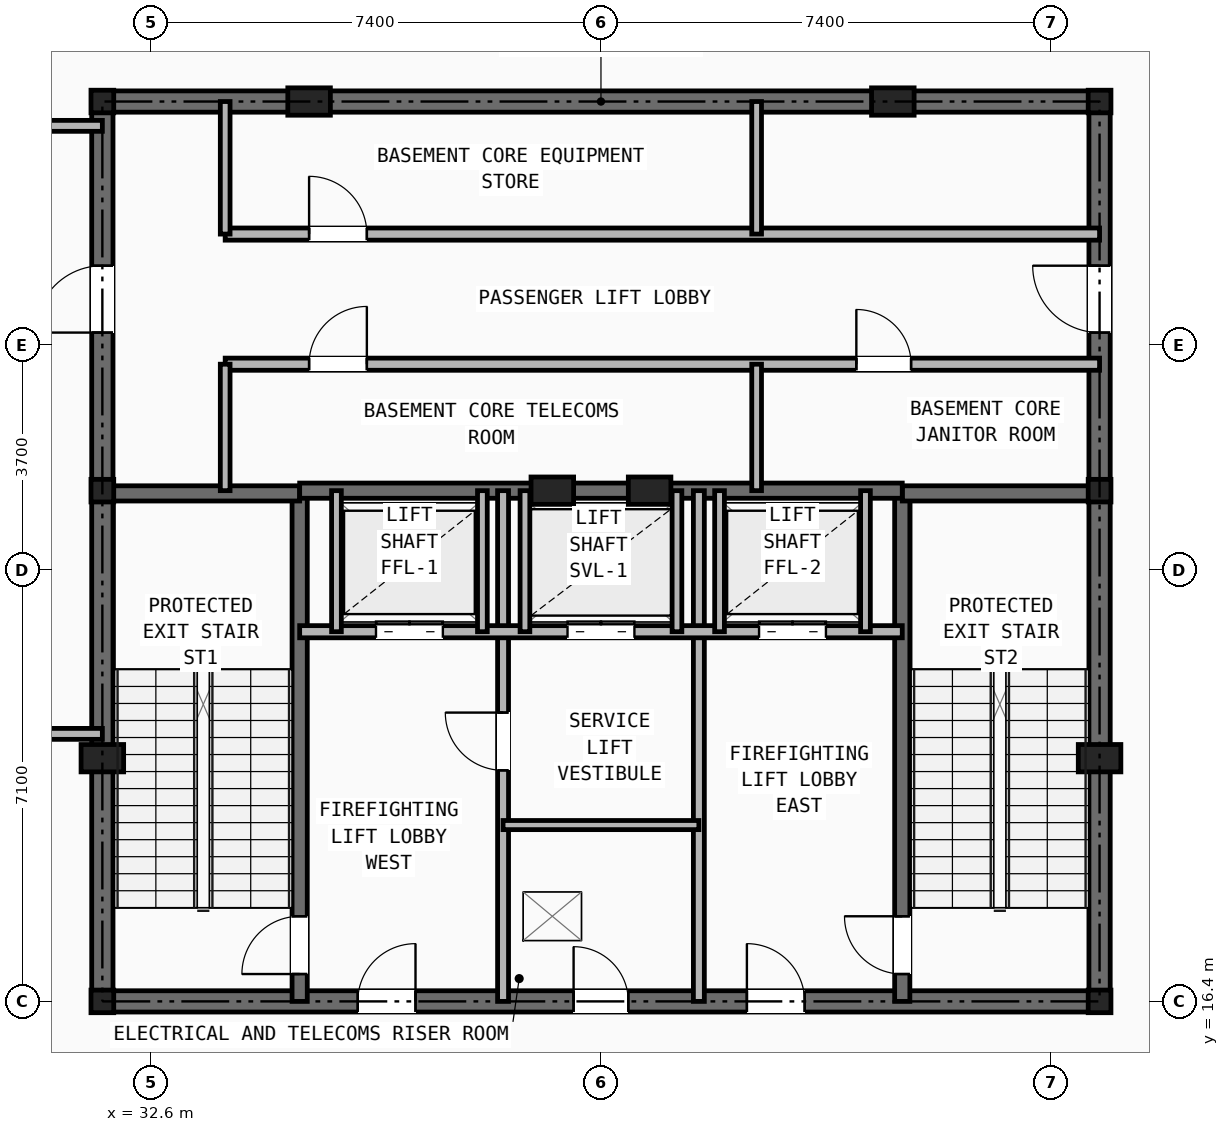
"""IFC4 building model, lengths in metres.
Left out: names, types, materials, properties, quantities, classifications, styles, units other than length and angle.
Written with IfcOpenShell. Run it as: python <this file> out.ifc"""

import sys

from ifc_helpers import new_model, si_unit, direction, frame, frame_2d, origin, origin_2d, place, context, subcontext, project, spatial, rectangle, i_section, extrude, element, fill, save


model = new_model("IFC4")
c1 = context("Model", 3, precision=1e-05, world=origin(), true_north=direction((0.0, 1.0)))
c2 = subcontext(c1, "Body", "Model", "MODEL_VIEW")
j1 = project(units=[si_unit("LENGTHUNIT", "METRE"), si_unit("PLANEANGLEUNIT", "RADIAN")], contexts=[c1])
p1 = place(None, origin())
s1 = spatial("IfcSite", under=j1, at=p1, CompositionType="ELEMENT")
p2 = place(p1, origin())
s2 = spatial("IfcBuilding", under=s1, at=p2, CompositionType="ELEMENT")
p3 = place(p2, frame((0.0, 0.0, -5.0)))
s3 = spatial("IfcBuildingStorey", under=s2, at=p3, CompositionType="ELEMENT", Elevation=-5.0)
for number, where, z_axis, x_axis in (
    (1, (31.8, 16.4, 0.0), (0.0, 0.0, 1.0), (1.0, 0.0, 0.0)),
    (2, (48.2, 16.4, 0.0), (0.0, 0.0, 1.0), (1.0, 0.0, 0.0)),
    (3, (31.8, 24.8, 0.0), (0.0, 0.0, 1.0), (1.0, 0.0, 0.0)),
    (4, (48.2, 24.8, 0.0), (0.0, 0.0, 1.0), (1.0, 0.0, 0.0)),
    (5, (31.8, 31.2, 0.0), (0.0, 0.0, 1.0), (1.0, 0.0, 0.0)),
    (6, (48.2, 31.2, 0.0), (0.0, 0.0, 1.0), (1.0, 0.0, 0.0)),
):
    element("IfcColumn", number, at=place(p3, frame(where, z_axis=z_axis, x_axis=x_axis)), inside=s3, PredefinedType="COLUMN", context=c2, shape_type="SweptSolid", body=[
        extrude(i_section(OverallWidth=0.374, OverallDepth=0.372, WebThickness=0.016, FlangeThickness=0.026, at=origin_2d()), origin(), (0.0, 0.0, 1.0), 5.0),
    ])
for number, where, z_axis, x_axis in (
    (7, (31.8, 20.4, 0.0), (0.0, 0.0, 1.0), (1.0, 0.0, 0.0)),
    (8, (48.2, 20.4, 0.0), (0.0, 0.0, 1.0), (1.0, 0.0, 0.0)),
    (9, (35.2, 31.2, 0.0), (0.0, 0.0, 1.0), (1.0, 0.0, 0.0)),
    (10, (44.8, 31.2, 0.0), (0.0, 0.0, 1.0), (1.0, 0.0, 0.0)),
    (11, (39.2, 24.8, 0.0), (0.0, 0.0, 1.0), (1.0, 0.0, 0.0)),
    (12, (40.8, 24.8, 0.0), (0.0, 0.0, 1.0), (1.0, 0.0, 0.0)),
):
    element("IfcColumn", number, at=place(p3, frame(where, z_axis=z_axis, x_axis=x_axis)), inside=s3, PredefinedType="PILASTER", context=c2, shape_type="SweptSolid", body=[
        extrude(rectangle(XDim=0.7, YDim=0.45, at=origin_2d()), origin(), (0.0, 0.0, 1.0), 5.0),
    ])
p4 = place(p3, frame((31.8, 16.4, 0.0), z_axis=(0.0, 0.0, 1.0), x_axis=(1.0, 0.0, 0.0)))
e13 = element("IfcWall", 13, at=p4, inside=s3, PredefinedType="SHEAR", context=c2, shape_type="SweptSolid", body=[
    extrude(rectangle(XDim=16.4, YDim=0.35, at=frame_2d((8.2, 0.0))), origin(), (0.0, 0.0, 1.0), 4.65),
])
p5 = place(p4, frame((7.75, 0.0, 0.0)))
e14 = element("IfcOpeningElement", 14, at=p5, cuts=e13, PredefinedType="OPENING", context=c2, shape_type="SweptSolid", body=[
    extrude(rectangle(XDim=0.9, YDim=2.1, at=frame_2d((0.45, 1.05))), frame((0.0, 0.185, 0.0), z_axis=(0.0, -1.0, 0.0), x_axis=(1.0, 0.0, 0.0)), (0.0, 0.0, 1.0), 0.37),
])
p6 = place(p4, frame((4.2, 0.0, 0.0)))
e15 = element("IfcOpeningElement", 15, at=p6, cuts=e13, PredefinedType="OPENING", context=c2, shape_type="SweptSolid", body=[
    extrude(rectangle(XDim=0.95, YDim=2.1, at=frame_2d((0.475, 1.05))), frame((0.0, 0.185, 0.0), z_axis=(0.0, -1.0, 0.0), x_axis=(1.0, 0.0, 0.0)), (0.0, 0.0, 1.0), 0.37),
])
p7 = place(p4, frame((10.6, 0.0, 0.0)))
e16 = element("IfcOpeningElement", 16, at=p7, cuts=e13, PredefinedType="OPENING", context=c2, shape_type="SweptSolid", body=[
    extrude(rectangle(XDim=0.95, YDim=2.1, at=frame_2d((0.475, 1.05))), frame((0.0, 0.185, 0.0), z_axis=(0.0, -1.0, 0.0), x_axis=(1.0, 0.0, 0.0)), (0.0, 0.0, 1.0), 0.37),
])
p8 = place(p3, frame((31.8, 31.2, 0.0), z_axis=(0.0, 0.0, 1.0), x_axis=(1.0, 0.0, 0.0)))
e17 = element("IfcWall", 17, at=p8, inside=s3, PredefinedType="SHEAR", context=c2, shape_type="SweptSolid", body=[
    extrude(rectangle(XDim=16.4, YDim=0.35, at=frame_2d((8.2, 0.0))), origin(), (0.0, 0.0, 1.0), 4.65),
])
p9 = place(p3, frame((31.8, 16.4, 0.0), z_axis=(0.0, 0.0, 1.0), x_axis=(0.0, 1.0, 0.0)))
e18 = element("IfcWall", 18, at=p9, inside=s3, PredefinedType="SHEAR", context=c2, shape_type="SweptSolid", body=[
    extrude(rectangle(XDim=14.8, YDim=0.35, at=frame_2d((7.4, 0.0))), origin(), (0.0, 0.0, 1.0), 4.65),
])
p10 = place(p9, frame((11.0, 0.0, 0.0)))
e19 = element("IfcOpeningElement", 19, at=p10, cuts=e18, PredefinedType="OPENING", context=c2, shape_type="SweptSolid", body=[
    extrude(rectangle(XDim=1.1, YDim=2.15, at=frame_2d((0.55, 1.075))), frame((0.0, 0.185, 0.0), z_axis=(0.0, -1.0, 0.0), x_axis=(1.0, 0.0, 0.0)), (0.0, 0.0, 1.0), 0.37),
])
p11 = place(p3, frame((48.2, 16.4, 0.0), z_axis=(0.0, 0.0, 1.0), x_axis=(0.0, 1.0, 0.0)))
e20 = element("IfcWall", 20, at=p11, inside=s3, PredefinedType="SHEAR", context=c2, shape_type="SweptSolid", body=[
    extrude(rectangle(XDim=14.8, YDim=0.35, at=frame_2d((7.4, 0.0))), origin(), (0.0, 0.0, 1.0), 4.65),
])
p12 = place(p11, frame((11.0, 0.0, 0.0)))
e21 = element("IfcOpeningElement", 21, at=p12, cuts=e20, PredefinedType="OPENING", context=c2, shape_type="SweptSolid", body=[
    extrude(rectangle(XDim=1.1, YDim=2.15, at=frame_2d((0.55, 1.075))), frame((0.0, 0.185, 0.0), z_axis=(0.0, -1.0, 0.0), x_axis=(1.0, 0.0, 0.0)), (0.0, 0.0, 1.0), 0.37),
])
p13 = place(p3, frame((35.045, 16.4, 0.0), z_axis=(0.0, 0.0, 1.0), x_axis=(0.0, 1.0, 0.0)))
e22 = element("IfcWall", 22, at=p13, inside=s3, PredefinedType="SHEAR", context=c2, shape_type="SweptSolid", body=[
    extrude(rectangle(XDim=8.4, YDim=0.25, at=frame_2d((4.2, 0.0))), origin(), (0.0, 0.0, 1.0), 4.65),
])
p14 = place(p13, frame((0.45, 0.0, 0.0)))
e23 = element("IfcOpeningElement", 23, at=p14, cuts=e22, PredefinedType="OPENING", context=c2, shape_type="SweptSolid", body=[
    extrude(rectangle(XDim=0.95, YDim=2.1, at=frame_2d((0.475, 1.05))), frame((0.0, 0.135, 0.0), z_axis=(0.0, -1.0, 0.0), x_axis=(1.0, 0.0, 0.0)), (0.0, 0.0, 1.0), 0.27),
])
p15 = place(p3, frame((31.8, 24.755, 0.0), z_axis=(0.0, 0.0, 1.0), x_axis=(1.0, 0.0, 0.0)))
e24 = element("IfcWall", 24, at=p15, inside=s3, PredefinedType="SHEAR", context=c2, shape_type="SweptSolid", body=[
    extrude(rectangle(XDim=3.245, YDim=0.25, at=frame_2d((1.623, 0.0))), origin(), (0.0, 0.0, 1.0), 4.65),
])
p16 = place(p3, frame((44.955, 16.4, 0.0), z_axis=(0.0, 0.0, 1.0), x_axis=(0.0, 1.0, 0.0)))
e25 = element("IfcWall", 25, at=p16, inside=s3, PredefinedType="SHEAR", context=c2, shape_type="SweptSolid", body=[
    extrude(rectangle(XDim=8.4, YDim=0.25, at=frame_2d((4.2, 0.0))), origin(), (0.0, 0.0, 1.0), 4.65),
])
p17 = place(p16, frame((0.45, 0.0, 0.0)))
e26 = element("IfcOpeningElement", 26, at=p17, cuts=e25, PredefinedType="OPENING", context=c2, shape_type="SweptSolid", body=[
    extrude(rectangle(XDim=0.95, YDim=2.1, at=frame_2d((0.475, 1.05))), frame((0.0, 0.135, 0.0), z_axis=(0.0, -1.0, 0.0), x_axis=(1.0, 0.0, 0.0)), (0.0, 0.0, 1.0), 0.27),
])
p18 = place(p3, frame((44.955, 24.755, 0.0), z_axis=(0.0, 0.0, 1.0), x_axis=(1.0, 0.0, 0.0)))
e27 = element("IfcWall", 27, at=p18, inside=s3, PredefinedType="SHEAR", context=c2, shape_type="SweptSolid", body=[
    extrude(rectangle(XDim=3.245, YDim=0.25, at=frame_2d((1.623, 0.0))), origin(), (0.0, 0.0, 1.0), 4.65),
])
p19 = place(p3, frame((35.045, 24.8, 0.0), z_axis=(0.0, 0.0, 1.0), x_axis=(1.0, 0.0, 0.0)))
e28 = element("IfcWall", 28, at=p19, inside=s3, PredefinedType="SHEAR", context=c2, shape_type="SweptSolid", body=[
    extrude(rectangle(XDim=9.91, YDim=0.25, at=frame_2d((4.955, 0.0))), origin(), (0.0, 0.0, 1.0), 4.65),
])
p20 = place(p3, frame((38.39, 16.4, 0.0), z_axis=(0.0, 0.0, 1.0), x_axis=(0.0, 1.0, 0.0)))
e29 = element("IfcWall", 29, at=p20, inside=s3, PredefinedType="PARTITIONING", context=c2, shape_type="SweptSolid", body=[
    extrude(rectangle(XDim=8.4, YDim=0.18, at=frame_2d((4.2, 0.0))), origin(), (0.0, 0.0, 1.0), 3.79),
])
p21 = place(p20, frame((3.8, 0.0, 0.0)))
e30 = element("IfcOpeningElement", 30, at=p21, cuts=e29, PredefinedType="OPENING", context=c2, shape_type="SweptSolid", body=[
    extrude(rectangle(XDim=0.95, YDim=2.1, at=frame_2d((0.475, 1.05))), frame((0.0, 0.1, 0.0), z_axis=(0.0, -1.0, 0.0), x_axis=(1.0, 0.0, 0.0)), (0.0, 0.0, 1.0), 0.2),
])
p22 = place(p3, frame((41.61, 16.4, 0.0), z_axis=(0.0, 0.0, 1.0), x_axis=(0.0, 1.0, 0.0)))
e31 = element("IfcWall", 31, at=p22, inside=s3, PredefinedType="PARTITIONING", context=c2, shape_type="SweptSolid", body=[
    extrude(rectangle(XDim=8.4, YDim=0.18, at=frame_2d((4.2, 0.0))), origin(), (0.0, 0.0, 1.0), 3.79),
])
p23 = place(p3, frame((35.045, 22.48, 0.0), z_axis=(0.0, 0.0, 1.0), x_axis=(1.0, 0.0, 0.0)))
e32 = element("IfcWall", 32, at=p23, inside=s3, PredefinedType="SOLIDWALL", context=c2, shape_type="SweptSolid", body=[
    extrude(rectangle(XDim=9.91, YDim=0.2, at=frame_2d((4.955, 0.0))), origin(), (0.0, 0.0, 1.0), 4.65),
])
p24 = place(p23, frame((1.255, 0.0, 0.0)))
e33 = element("IfcOpeningElement", 33, at=p24, cuts=e32, PredefinedType="OPENING", context=c2, shape_type="SweptSolid", body=[
    extrude(rectangle(XDim=1.1, YDim=2.15, at=frame_2d((0.55, 1.075))), frame((0.0, 0.11, 0.0), z_axis=(0.0, -1.0, 0.0), x_axis=(1.0, 0.0, 0.0)), (0.0, 0.0, 1.0), 0.22),
])
p25 = place(p23, frame((7.555, 0.0, 0.0)))
e34 = element("IfcOpeningElement", 34, at=p25, cuts=e32, PredefinedType="OPENING", context=c2, shape_type="SweptSolid", body=[
    extrude(rectangle(XDim=1.1, YDim=2.15, at=frame_2d((0.55, 1.075))), frame((0.0, 0.11, 0.0), z_axis=(0.0, -1.0, 0.0), x_axis=(1.0, 0.0, 0.0)), (0.0, 0.0, 1.0), 0.22),
])
p26 = place(p23, frame((4.405, 0.0, 0.0)))
e35 = element("IfcOpeningElement", 35, at=p26, cuts=e32, PredefinedType="OPENING", context=c2, shape_type="SweptSolid", body=[
    extrude(rectangle(XDim=1.1, YDim=2.15, at=frame_2d((0.55, 1.075))), frame((0.0, 0.11, 0.0), z_axis=(0.0, -1.0, 0.0), x_axis=(1.0, 0.0, 0.0)), (0.0, 0.0, 1.0), 0.22),
])
p27 = place(p3, frame((38.39, 19.3, 0.0), z_axis=(0.0, 0.0, 1.0), x_axis=(1.0, 0.0, 0.0)))
e36 = element("IfcWall", 36, at=p27, inside=s3, PredefinedType="PARTITIONING", context=c2, shape_type="SweptSolid", body=[
    extrude(rectangle(XDim=3.22, YDim=0.15, at=frame_2d((1.61, 0.0))), origin(), (0.0, 0.0, 1.0), 4.65),
])
for number, where, z_axis, x_axis in (
    (37, (35.65, 22.48, 0.0), (0.0, 0.0, 1.0), (0.0, 1.0, 0.0)),
    (38, (38.05, 22.48, 0.0), (0.0, 0.0, 1.0), (0.0, 1.0, 0.0)),
    (39, (41.95, 22.48, 0.0), (0.0, 0.0, 1.0), (0.0, 1.0, 0.0)),
    (40, (44.35, 22.48, 0.0), (0.0, 0.0, 1.0), (0.0, 1.0, 0.0)),
    (41, (38.75, 22.48, 0.0), (0.0, 0.0, 1.0), (0.0, 1.0, 0.0)),
    (42, (41.25, 22.48, 0.0), (0.0, 0.0, 1.0), (0.0, 1.0, 0.0)),
):
    element("IfcWall", number, at=place(p3, frame(where, z_axis=z_axis, x_axis=x_axis)), inside=s3, PredefinedType="SOLIDWALL", context=c2, shape_type="SweptSolid", body=[
        extrude(rectangle(XDim=2.32, YDim=0.16, at=frame_2d((1.16, 0.0))), origin(), (0.0, 0.0, 1.0), 4.65),
    ])
p28 = place(p3, frame((33.82, 29.02, 0.0), z_axis=(0.0, 0.0, 1.0), x_axis=(1.0, 0.0, 0.0)))
e43 = element("IfcWall", 43, at=p28, inside=s3, PredefinedType="SOLIDWALL", context=c2, shape_type="SweptSolid", body=[
    extrude(rectangle(XDim=14.38, YDim=0.2, at=frame_2d((7.19, 0.0))), origin(), (0.0, 0.0, 1.0), 4.65),
])
p29 = place(p28, frame((1.38, 0.0, 0.0)))
e44 = element("IfcOpeningElement", 44, at=p29, cuts=e43, PredefinedType="OPENING", context=c2, shape_type="SweptSolid", body=[
    extrude(rectangle(XDim=0.95, YDim=2.1, at=frame_2d((0.475, 1.05))), frame((0.0, 0.11, 0.0), z_axis=(0.0, -1.0, 0.0), x_axis=(1.0, 0.0, 0.0)), (0.0, 0.0, 1.0), 0.22),
])
p30 = place(p3, frame((33.82, 26.88, 0.0), z_axis=(0.0, 0.0, 1.0), x_axis=(1.0, 0.0, 0.0)))
e45 = element("IfcWall", 45, at=p30, inside=s3, PredefinedType="SOLIDWALL", context=c2, shape_type="SweptSolid", body=[
    extrude(rectangle(XDim=14.38, YDim=0.2, at=frame_2d((7.19, 0.0))), origin(), (0.0, 0.0, 1.0), 4.65),
])
p31 = place(p30, frame((1.38, 0.0, 0.0)))
e46 = element("IfcOpeningElement", 46, at=p31, cuts=e45, PredefinedType="OPENING", context=c2, shape_type="SweptSolid", body=[
    extrude(rectangle(XDim=0.95, YDim=2.1, at=frame_2d((0.475, 1.05))), frame((0.0, 0.11, 0.0), z_axis=(0.0, -1.0, 0.0), x_axis=(1.0, 0.0, 0.0)), (0.0, 0.0, 1.0), 0.22),
])
p32 = place(p30, frame((10.38, 0.0, 0.0)))
e47 = element("IfcOpeningElement", 47, at=p32, cuts=e45, PredefinedType="OPENING", context=c2, shape_type="SweptSolid", body=[
    extrude(rectangle(XDim=0.9, YDim=2.1, at=frame_2d((0.45, 1.05))), frame((0.0, 0.11, 0.0), z_axis=(0.0, -1.0, 0.0), x_axis=(1.0, 0.0, 0.0)), (0.0, 0.0, 1.0), 0.22),
])
p33 = place(p3, frame((33.82, 29.02, 0.0), z_axis=(0.0, 0.0, 1.0), x_axis=(0.0, 1.0, 0.0)))
e48 = element("IfcWall", 48, at=p33, inside=s3, PredefinedType="SOLIDWALL", context=c2, shape_type="SweptSolid", body=[
    extrude(rectangle(XDim=2.18, YDim=0.16, at=frame_2d((1.09, 0.0))), origin(), (0.0, 0.0, 1.0), 3.79),
])
p34 = place(p3, frame((33.82, 24.8, 0.0), z_axis=(0.0, 0.0, 1.0), x_axis=(0.0, 1.0, 0.0)))
e49 = element("IfcWall", 49, at=p34, inside=s3, PredefinedType="SOLIDWALL", context=c2, shape_type="SweptSolid", body=[
    extrude(rectangle(XDim=2.08, YDim=0.16, at=frame_2d((1.04, 0.0))), origin(), (0.0, 0.0, 1.0), 4.65),
])
p35 = place(p3, frame((42.56, 29.02, 0.0), z_axis=(0.0, 0.0, 1.0), x_axis=(0.0, 1.0, 0.0)))
e50 = element("IfcWall", 50, at=p35, inside=s3, PredefinedType="SOLIDWALL", context=c2, shape_type="SweptSolid", body=[
    extrude(rectangle(XDim=2.18, YDim=0.16, at=frame_2d((1.09, 0.0))), origin(), (0.0, 0.0, 1.0), 3.79),
])
p36 = place(p3, frame((42.56, 24.8, 0.0), z_axis=(0.0, 0.0, 1.0), x_axis=(0.0, 1.0, 0.0)))
e51 = element("IfcWall", 51, at=p36, inside=s3, PredefinedType="SOLIDWALL", context=c2, shape_type="SweptSolid", body=[
    extrude(rectangle(XDim=2.08, YDim=0.16, at=frame_2d((1.04, 0.0))), origin(), (0.0, 0.0, 1.0), 4.65),
])
p37 = place(p3, frame((25.2, 20.8, 0.0), z_axis=(0.0, 0.0, 1.0), x_axis=(1.0, 0.0, 0.0)))
e52 = element("IfcWall", 52, at=p37, inside=s3, PredefinedType="PARTITIONING", context=c2, shape_type="SweptSolid", body=[
    extrude(rectangle(XDim=6.6, YDim=0.18, at=frame_2d((3.3, 0.0))), origin(), (0.0, 0.0, 1.0), 4.65),
])
p38 = place(p3, frame((25.2, 30.8, 0.0), z_axis=(0.0, 0.0, 1.0), x_axis=(1.0, 0.0, 0.0)))
e53 = element("IfcWall", 53, at=p38, inside=s3, PredefinedType="PARTITIONING", context=c2, shape_type="SweptSolid", body=[
    extrude(rectangle(XDim=6.6, YDim=0.18, at=frame_2d((3.3, 0.0))), origin(), (0.0, 0.0, 1.0), 3.79),
])
p39 = place(p5, origin())
e54 = element("IfcDoor", 54, at=p39, inside=s3, OperationType="SINGLE_SWING_LEFT", PredefinedType="DOOR", context=c2, shape_type="SweptSolid", body=[
    extrude(rectangle(XDim=0.9, YDim=2.1, at=frame_2d((0.45, 1.05))), frame((0.0, 0.025, 0.0), z_axis=(0.0, -1.0, 0.0), x_axis=(1.0, 0.0, 0.0)), (0.0, 0.0, 1.0), 0.05),
])
fill(e14, e54)
p40 = place(p21, origin())
e55 = element("IfcDoor", 55, at=p40, inside=s3, OperationType="SINGLE_SWING_RIGHT", PredefinedType="DOOR", context=c2, shape_type="SweptSolid", body=[
    extrude(rectangle(XDim=0.95, YDim=2.1, at=frame_2d((0.475, 1.05))), frame((0.0, 0.025, 0.0), z_axis=(0.0, -1.0, 0.0), x_axis=(1.0, 0.0, 0.0)), (0.0, 0.0, 1.0), 0.05),
])
fill(e30, e55)
p41 = place(p14, origin())
e56 = element("IfcDoor", 56, at=p41, inside=s3, OperationType="SINGLE_SWING_LEFT", PredefinedType="DOOR", context=c2, shape_type="SweptSolid", body=[
    extrude(rectangle(XDim=0.95, YDim=2.1, at=frame_2d((0.475, 1.05))), frame((0.0, 0.025, 0.0), z_axis=(0.0, -1.0, 0.0), x_axis=(1.0, 0.0, 0.0)), (0.0, 0.0, 1.0), 0.05),
])
fill(e23, e56)
p42 = place(p17, origin())
e57 = element("IfcDoor", 57, at=p42, inside=s3, OperationType="SINGLE_SWING_RIGHT", PredefinedType="DOOR", context=c2, shape_type="SweptSolid", body=[
    extrude(rectangle(XDim=0.95, YDim=2.1, at=frame_2d((0.475, 1.05))), frame((0.0, 0.025, 0.0), z_axis=(0.0, -1.0, 0.0), x_axis=(1.0, 0.0, 0.0)), (0.0, 0.0, 1.0), 0.05),
])
fill(e26, e57)
p43 = place(p6, origin())
e58 = element("IfcDoor", 58, at=p43, inside=s3, OperationType="SINGLE_SWING_RIGHT", PredefinedType="DOOR", context=c2, shape_type="SweptSolid", body=[
    extrude(rectangle(XDim=0.95, YDim=2.1, at=frame_2d((0.475, 1.05))), frame((0.0, 0.025, 0.0), z_axis=(0.0, -1.0, 0.0), x_axis=(1.0, 0.0, 0.0)), (0.0, 0.0, 1.0), 0.05),
])
fill(e15, e58)
p44 = place(p7, origin())
e59 = element("IfcDoor", 59, at=p44, inside=s3, OperationType="SINGLE_SWING_LEFT", PredefinedType="DOOR", context=c2, shape_type="SweptSolid", body=[
    extrude(rectangle(XDim=0.95, YDim=2.1, at=frame_2d((0.475, 1.05))), frame((0.0, 0.025, 0.0), z_axis=(0.0, -1.0, 0.0), x_axis=(1.0, 0.0, 0.0)), (0.0, 0.0, 1.0), 0.05),
])
fill(e16, e59)
p45 = place(p24, origin())
e60 = element("IfcDoor", 60, at=p45, inside=s3, OperationType="DOUBLE_DOOR_SLIDING", PredefinedType="DOOR", context=c2, shape_type="SweptSolid", body=[
    extrude(rectangle(XDim=1.1, YDim=2.15, at=frame_2d((0.55, 1.075))), frame((0.0, 0.025, 0.0), z_axis=(0.0, -1.0, 0.0), x_axis=(1.0, 0.0, 0.0)), (0.0, 0.0, 1.0), 0.05),
])
fill(e33, e60)
p46 = place(p25, origin())
e61 = element("IfcDoor", 61, at=p46, inside=s3, OperationType="DOUBLE_DOOR_SLIDING", PredefinedType="DOOR", context=c2, shape_type="SweptSolid", body=[
    extrude(rectangle(XDim=1.1, YDim=2.15, at=frame_2d((0.55, 1.075))), frame((0.0, 0.025, 0.0), z_axis=(0.0, -1.0, 0.0), x_axis=(1.0, 0.0, 0.0)), (0.0, 0.0, 1.0), 0.05),
])
fill(e34, e61)
p47 = place(p26, origin())
e62 = element("IfcDoor", 62, at=p47, inside=s3, OperationType="DOUBLE_DOOR_SLIDING", PredefinedType="DOOR", context=c2, shape_type="SweptSolid", body=[
    extrude(rectangle(XDim=1.1, YDim=2.15, at=frame_2d((0.55, 1.075))), frame((0.0, 0.025, 0.0), z_axis=(0.0, -1.0, 0.0), x_axis=(1.0, 0.0, 0.0)), (0.0, 0.0, 1.0), 0.05),
])
fill(e35, e62)
p48 = place(p10, origin())
e63 = element("IfcDoor", 63, at=p48, inside=s3, OperationType="SINGLE_SWING_LEFT", PredefinedType="DOOR", context=c2, shape_type="SweptSolid", body=[
    extrude(rectangle(XDim=1.1, YDim=2.15, at=frame_2d((0.55, 1.075))), frame((0.0, 0.025, 0.0), z_axis=(0.0, -1.0, 0.0), x_axis=(1.0, 0.0, 0.0)), (0.0, 0.0, 1.0), 0.05),
])
fill(e19, e63)
p49 = place(p12, origin())
e64 = element("IfcDoor", 64, at=p49, inside=s3, OperationType="SINGLE_SWING_RIGHT", PredefinedType="DOOR", context=c2, shape_type="SweptSolid", body=[
    extrude(rectangle(XDim=1.1, YDim=2.15, at=frame_2d((0.55, 1.075))), frame((0.0, 0.025, 0.0), z_axis=(0.0, -1.0, 0.0), x_axis=(1.0, 0.0, 0.0)), (0.0, 0.0, 1.0), 0.05),
])
fill(e21, e64)
p50 = place(p29, origin())
e65 = element("IfcDoor", 65, at=p50, inside=s3, OperationType="SINGLE_SWING_LEFT", PredefinedType="DOOR", context=c2, shape_type="SweptSolid", body=[
    extrude(rectangle(XDim=0.95, YDim=2.1, at=frame_2d((0.475, 1.05))), frame((0.0, 0.025, 0.0), z_axis=(0.0, -1.0, 0.0), x_axis=(1.0, 0.0, 0.0)), (0.0, 0.0, 1.0), 0.05),
])
fill(e44, e65)
p51 = place(p31, origin())
e66 = element("IfcDoor", 66, at=p51, inside=s3, OperationType="SINGLE_SWING_RIGHT", PredefinedType="DOOR", context=c2, shape_type="SweptSolid", body=[
    extrude(rectangle(XDim=0.95, YDim=2.1, at=frame_2d((0.475, 1.05))), frame((0.0, 0.025, 0.0), z_axis=(0.0, -1.0, 0.0), x_axis=(1.0, 0.0, 0.0)), (0.0, 0.0, 1.0), 0.05),
])
fill(e46, e66)
p52 = place(p32, origin())
e67 = element("IfcDoor", 67, at=p52, inside=s3, OperationType="SINGLE_SWING_LEFT", PredefinedType="DOOR", context=c2, shape_type="SweptSolid", body=[
    extrude(rectangle(XDim=0.9, YDim=2.1, at=frame_2d((0.45, 1.05))), frame((0.0, 0.025, 0.0), z_axis=(0.0, -1.0, 0.0), x_axis=(1.0, 0.0, 0.0)), (0.0, 0.0, 1.0), 0.05),
])
fill(e47, e67)
save(model, sys.argv[1])
